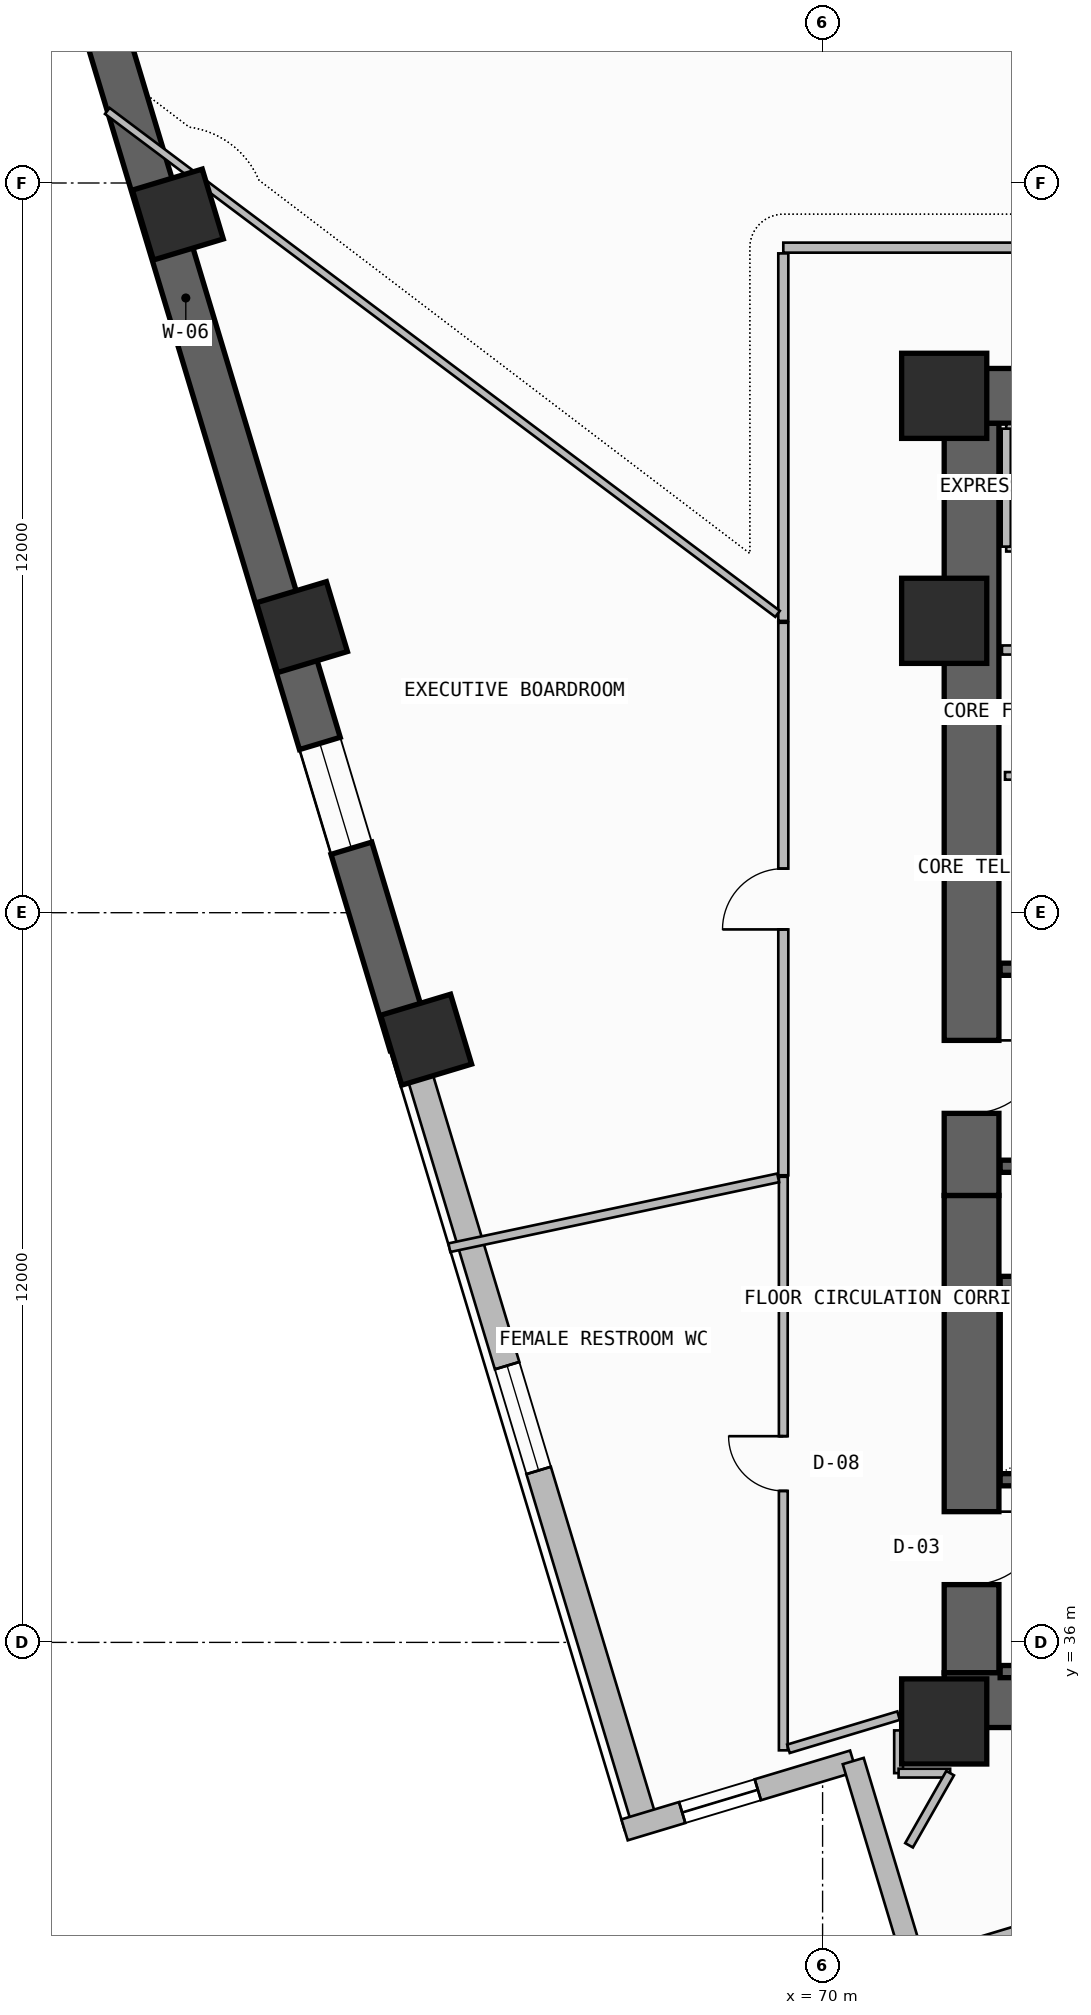
"""IFC4 building model, lengths in metres.
Left out: names, types, materials, properties, quantities, classifications, styles, units other than length and angle.
Written with IfcOpenShell. Run it as: python <this file> out.ifc"""

import sys

from ifc_helpers import new_model, si_unit, direction, frame, frame_2d, origin, origin_2d, place, context, subcontext, project, spatial, rectangle, extrude, element, fill, save


model = new_model("IFC4")
c1 = context("Model", 3, precision=1e-05, world=origin(), true_north=direction((0.0, 1.0)))
c2 = subcontext(c1, "Body", "Model", "MODEL_VIEW")
j1 = project(units=[si_unit("LENGTHUNIT", "METRE"), si_unit("PLANEANGLEUNIT", "RADIAN")], contexts=[c1])
p1 = place(None, origin())
s1 = spatial("IfcSite", under=j1, at=p1, CompositionType="ELEMENT")
p2 = place(p1, origin())
s2 = spatial("IfcBuilding", under=s1, at=p2, CompositionType="ELEMENT")
p3 = place(p2, frame((0.0, 0.0, 132.3)))
s3 = spatial("IfcBuildingStorey", under=s2, at=p3, CompositionType="ELEMENT", Elevation=132.3)
p4 = place(p3, frame((72.45, 35.5, -0.4), z_axis=(0.0, 0.0, 1.0), x_axis=(0.0, 1.0, 0.0)))
e1 = element("IfcWall", 1, at=p4, inside=s3, PredefinedType="SHEAR", context=c2, shape_type="SweptSolid", body=[
    extrude(rectangle(XDim=7.85, YDim=0.9, at=frame_2d((3.925, 0.0))), origin(), (0.0, 0.0, 1.0), 3.74),
])
p5 = place(p4, frame((1.45, 0.0, 0.4)))
e2 = element("IfcOpeningElement", 2, at=p5, cuts=e1, PredefinedType="OPENING", context=c2, shape_type="SweptSolid", body=[
    extrude(rectangle(XDim=1.2, YDim=2.2, at=frame_2d((0.6, 1.1))), frame((0.0, 0.46, 0.0), z_axis=(0.0, -1.0, 0.0), x_axis=(1.0, 0.0, 0.0)), (0.0, 0.0, 1.0), 0.92),
])
p6 = place(p3, frame((72.0, 35.05, -0.4), z_axis=(0.0, 0.0, 1.0), x_axis=(1.0, 0.0, 0.0)))
e3 = element("IfcWall", 3, at=p6, inside=s3, PredefinedType="SHEAR", context=c2, shape_type="SweptSolid", body=[
    extrude(rectangle(XDim=13.9, YDim=0.9, at=frame_2d((6.95, 0.0))), origin(), (0.0, 0.0, 1.0), 3.74),
])
p7 = place(p3, frame((72.45, 43.35, -0.4), z_axis=(0.0, 0.0, 1.0), x_axis=(0.0, 1.0, 0.0)))
e4 = element("IfcWall", 4, at=p7, inside=s3, PredefinedType="SHEAR", context=c2, shape_type="SweptSolid", body=[
    extrude(rectangle(XDim=12.7, YDim=0.9, at=frame_2d((6.35, 0.0))), origin(), (0.0, 0.0, 1.0), 3.74),
])
p8 = place(p7, frame((1.35, 0.0, 0.4)))
e5 = element("IfcOpeningElement", 5, at=p8, cuts=e4, PredefinedType="OPENING", context=c2, shape_type="SweptSolid", body=[
    extrude(rectangle(XDim=1.2, YDim=2.2, at=frame_2d((0.6, 1.1))), frame((0.0, 0.46, 0.0), z_axis=(0.0, -1.0, 0.0), x_axis=(1.0, 0.0, 0.0)), (0.0, 0.0, 1.0), 0.92),
])
p9 = place(p3, frame((72.0, 56.5, -0.4), z_axis=(0.0, 0.0, 1.0), x_axis=(1.0, 0.0, 0.0)))
e6 = element("IfcWall", 6, at=p9, inside=s3, PredefinedType="SHEAR", context=c2, shape_type="SweptSolid", body=[
    extrude(rectangle(XDim=13.9, YDim=0.9, at=frame_2d((6.95, 0.0))), origin(), (0.0, 0.0, 1.0), 3.74),
])
for number, where, z_axis, x_axis in (
    (7, (72.0, 34.7, 0.0), (0.0, 0.0, 1.0), (1.0, 0.0, 0.0)),
    (8, (72.0, 52.8, 0.0), (0.0, 0.0, 1.0), (1.0, 0.0, 0.0)),
    (9, (72.0, 56.5, 0.0), (0.0, 0.0, 1.0), (1.0, 0.0, 0.0)),
):
    element("IfcColumn", number, at=place(p3, frame(where, z_axis=z_axis, x_axis=x_axis)), inside=s3, PredefinedType="COLUMN", context=c2, shape_type="SweptSolid", body=[
        extrude(rectangle(XDim=1.4, YDim=1.4, at=origin_2d()), origin(), (0.0, 0.0, 1.0), 3.6),
    ])
for number, where, z_axis, x_axis in (
    (10, (59.396, 59.481, -0.4), (0.0, 0.0, 1.0), (-0.288, 0.958, 0.0)),
    (11, (61.438, 52.696, -0.4), (0.0, 0.0, 1.0), (-0.288, 0.958, 0.0)),
):
    element("IfcColumn", number, at=place(p3, frame(where, z_axis=z_axis, x_axis=x_axis)), inside=s3, PredefinedType="COLUMN", context=c2, shape_type="SweptSolid", body=[
        extrude(rectangle(XDim=1.2, YDim=1.2, at=origin_2d()), origin(), (0.0, 0.0, 1.0), 4.0),
    ])
p10 = place(p3, frame((63.48, 45.912, 0.0), z_axis=(0.0, 0.0, 1.0), x_axis=(-0.288196268134, 0.957571360805, 0.0)))
e12 = element("IfcColumn", 12, at=p10, inside=s3, PredefinedType="COLUMN", context=c2, shape_type="SweptSolid", body=[
    extrude(rectangle(XDim=1.2, YDim=1.2, at=origin_2d()), origin(), (0.0, 0.0, 1.0), 3.6),
])
p11 = place(p3, frame((71.535, 30.624, 0.0), z_axis=(0.0, 0.0, 1.0), x_axis=(0.957571099539, 0.288197136226, 0.0)))
e13 = element("IfcWall", 13, at=p11, inside=s3, PredefinedType="SOLIDWALL", context=c2, shape_type="SweptSolid", body=[
    extrude(rectangle(XDim=12.236, YDim=0.42, at=frame_2d((6.118, 0.0))), origin(), (0.0, 0.0, 1.0), 3.34),
])
p12 = place(p11, frame((7.264, 0.0, 1.2)))
e14 = element("IfcOpeningElement", 14, at=p12, cuts=e13, PredefinedType="OPENING", context=c2, shape_type="SweptSolid", body=[
    extrude(rectangle(XDim=2.4, YDim=0.9, at=frame_2d((1.2, 0.45))), frame((0.0, 0.22, 0.0), z_axis=(0.0, -1.0, 0.0), x_axis=(1.0, 0.0, 0.0)), (0.0, 0.0, 1.0), 0.44),
])
p13 = place(p3, frame((57.323, 65.434, -0.4), z_axis=(0.0, 0.0, 1.0), x_axis=(0.288188159352, -0.957573801234, 0.0)))
e15 = element("IfcWall", 15, at=p13, inside=s3, PredefinedType="SHEAR", context=c2, shape_type="SweptSolid", body=[
    extrude(rectangle(XDim=20.469, YDim=0.7, at=frame_2d((10.234, 0.0))), origin(), (0.0, 0.0, 1.0), 3.74),
])
p14 = place(p13, frame((15.3, 0.0, 1.2)))
e16 = element("IfcOpeningElement", 16, at=p14, cuts=e15, PredefinedType="OPENING", context=c2, shape_type="SweptSolid", body=[
    extrude(rectangle(XDim=1.8, YDim=0.9, at=frame_2d((0.9, 0.45))), frame((0.0, 0.36, 0.0), z_axis=(0.0, -1.0, 0.0), x_axis=(1.0, 0.0, 0.0)), (0.0, 0.0, 1.0), 0.72),
])
p15 = place(p3, frame((63.221, 45.834, 0.0), z_axis=(0.0, 0.0, 1.0), x_axis=(0.288202962273, -0.957569346072, 0.0)))
e17 = element("IfcWall", 17, at=p15, inside=s3, PredefinedType="SOLIDWALL", context=c2, shape_type="SweptSolid", body=[
    extrude(rectangle(XDim=13.384, YDim=0.42, at=frame_2d((6.692, 0.0))), origin(), (0.0, 0.0, 1.0), 2.725),
])
p16 = place(p15, frame((5.517, 0.0, 1.2)))
e18 = element("IfcOpeningElement", 18, at=p16, cuts=e17, PredefinedType="OPENING", context=c2, shape_type="SweptSolid", body=[
    extrude(rectangle(XDim=1.8, YDim=0.9, at=frame_2d((0.9, 0.45))), frame((0.0, 0.22, 0.0), z_axis=(0.0, -1.0, 0.0), x_axis=(1.0, 0.0, 0.0)), (0.0, 0.0, 1.0), 0.44),
])
p17 = place(p3, frame((66.743, 32.917, 0.0), z_axis=(0.0, 0.0, 1.0), x_axis=(0.957584687378, 0.288151985068, 0.0)))
e19 = element("IfcWall", 19, at=p17, inside=s3, PredefinedType="SOLIDWALL", context=c2, shape_type="SweptSolid", body=[
    extrude(rectangle(XDim=3.927, YDim=0.36, at=frame_2d((1.963, 0.0))), origin(), (0.0, 0.0, 1.0), 3.34),
])
p18 = place(p17, frame((0.989, 0.0, 0.45)))
e20 = element("IfcOpeningElement", 20, at=p18, cuts=e19, PredefinedType="OPENING", context=c2, shape_type="SweptSolid", body=[
    extrude(rectangle(XDim=1.3, YDim=2.4, at=frame_2d((0.65, 1.2))), frame((0.0, 0.19, 0.0), z_axis=(0.0, -1.0, 0.0), x_axis=(1.0, 0.0, 0.0)), (0.0, 0.0, 1.0), 0.38),
])
p19 = place(p3, frame((70.504, 34.049, 0.0), z_axis=(0.0, 0.0, 1.0), x_axis=(0.288169140251, -0.957579524952, 0.0)))
e21 = element("IfcWall", 21, at=p19, inside=s3, PredefinedType="SOLIDWALL", context=c2, shape_type="SweptSolid", body=[
    extrude(rectangle(XDim=3.927, YDim=0.36, at=frame_2d((1.963, 0.0))), origin(), (0.0, 0.0, 1.0), 3.34),
])
p20 = place(p3, frame((89.368, 62.13, 0.0), z_axis=(0.0, 0.0, 1.0), x_axis=(-0.942033439765, 0.335518998515, 0.0)))
e22 = element("IfcWall", 22, at=p20, inside=s3, PredefinedType="PARAPET", context=c2, shape_type="SweptSolid", body=[
    extrude(rectangle(XDim=27.969, YDim=0.2, at=frame_2d((13.985, 0.0))), origin(), (0.0, 0.0, 1.0), 1.15),
])
for number, where, z_axis, x_axis in (
    (23, (72.92, 35.52, -0.4), (0.0, 0.0, 1.0), (1.0, 0.0, 0.0)),
    (24, (72.92, 38.675, -0.4), (0.0, 0.0, 1.0), (1.0, 0.0, 0.0)),
):
    element("IfcWall", number, at=place(p3, frame(where, z_axis=z_axis, x_axis=x_axis)), inside=s3, PredefinedType="SOLIDWALL", context=c2, shape_type="SweptSolid", body=[
        extrude(rectangle(XDim=7.7, YDim=0.2, at=frame_2d((3.85, 0.0))), origin(), (0.0, 0.0, 1.0), 3.74),
    ])
p21 = place(p3, frame((72.92, 41.92, -0.4), z_axis=(0.0, 0.0, 1.0), x_axis=(1.0, 0.0, 0.0)))
e25 = element("IfcWall", 25, at=p21, inside=s3, PredefinedType="SOLIDWALL", context=c2, shape_type="SweptSolid", body=[
    extrude(rectangle(XDim=7.58, YDim=0.2, at=frame_2d((3.79, 0.0))), origin(), (0.0, 0.0, 1.0), 3.74),
])
for number, where, z_axis, x_axis in (
    (26, (72.92, 43.83, -0.4), (0.0, 0.0, 1.0), (1.0, 0.0, 0.0)),
    (27, (72.92, 47.07, -0.4), (0.0, 0.0, 1.0), (1.0, 0.0, 0.0)),
):
    element("IfcWall", number, at=place(p3, frame(where, z_axis=z_axis, x_axis=x_axis)), inside=s3, PredefinedType="SOLIDWALL", context=c2, shape_type="SweptSolid", body=[
        extrude(rectangle(XDim=7.7, YDim=0.2, at=frame_2d((3.85, 0.0))), origin(), (0.0, 0.0, 1.0), 3.74),
    ])
p22 = place(p3, frame((72.95, 52.32, 0.0), z_axis=(0.0, 0.0, 1.0), x_axis=(1.0, 0.0, 0.0)))
e28 = element("IfcWall", 28, at=p22, inside=s3, PredefinedType="SOLIDWALL", context=c2, shape_type="SweptSolid", body=[
    extrude(rectangle(XDim=3.33, YDim=0.15, at=frame_2d((1.665, 0.0))), origin(), (0.0, 0.0, 1.0), 3.34),
])
p23 = place(p3, frame((73.0, 50.25, 0.0), z_axis=(0.0, 0.0, 1.0), x_axis=(1.0, 0.0, 0.0)))
e29 = element("IfcWall", 29, at=p23, inside=s3, PredefinedType="PARTITIONING", context=c2, shape_type="SweptSolid", body=[
    extrude(rectangle(XDim=3.28, YDim=0.125, at=frame_2d((1.64, 0.0))), origin(), (0.0, 0.0, 1.0), 3.34),
])
p24 = place(p3, frame((73.02, 54.02, 0.0), z_axis=(0.0, 0.0, 1.0), x_axis=(1.0, 0.0, 0.0)))
e30 = element("IfcWall", 30, at=p24, inside=s3, PredefinedType="SOLIDWALL", context=c2, shape_type="SweptSolid", body=[
    extrude(rectangle(XDim=12.08, YDim=0.16, at=frame_2d((6.04, 0.0))), origin(), (0.0, 0.0, 1.0), 3.34),
])
p25 = place(p3, frame((73.02, 55.96, 0.0), z_axis=(0.0, 0.0, 1.0), x_axis=(1.0, 0.0, 0.0)))
e31 = element("IfcWall", 31, at=p25, inside=s3, PredefinedType="SOLIDWALL", context=c2, shape_type="SweptSolid", body=[
    extrude(rectangle(XDim=3.5, YDim=0.15, at=frame_2d((1.75, 0.0))), origin(), (0.0, 0.0, 1.0), 3.34),
])
p26 = place(p3, frame((73.02, 54.02, 0.0), z_axis=(0.0, 0.0, 1.0), x_axis=(0.0, 1.0, 0.0)))
e32 = element("IfcWall", 32, at=p26, inside=s3, PredefinedType="PLUMBINGWALL", context=c2, shape_type="SweptSolid", body=[
    extrude(rectangle(XDim=1.94, YDim=0.15, at=frame_2d((0.97, 0.0))), origin(), (0.0, 0.0, 1.0), 3.34),
])
p27 = place(p3, frame((69.354, 43.657, 0.0), z_axis=(0.0, 0.0, 1.0), x_axis=(0.0, -1.0, 0.0)))
e33 = element("IfcWall", 33, at=p27, inside=s3, PredefinedType="PARTITIONING", context=c2, shape_type="SweptSolid", body=[
    extrude(rectangle(XDim=9.432, YDim=0.145, at=frame_2d((4.716, 0.0))), origin(), (0.0, 0.0, 1.0), 3.34),
])
p28 = place(p27, frame((4.266, 0.0, 0.0)))
e34 = element("IfcOpeningElement", 34, at=p28, cuts=e33, PredefinedType="OPENING", context=c2, shape_type="SweptSolid", body=[
    extrude(rectangle(XDim=0.9, YDim=2.1, at=frame_2d((0.45, 1.05))), frame((0.0, 0.083, 0.0), z_axis=(0.0, -1.0, 0.0), x_axis=(1.0, 0.0, 0.0)), (0.0, 0.0, 1.0), 0.165),
])
p29 = place(p3, frame((69.438, 34.25, 0.0), z_axis=(0.0, 0.0, 1.0), x_axis=(0.957552396669, 0.288259271548, 0.0)))
e35 = element("IfcWall", 35, at=p29, inside=s3, PredefinedType="PARTITIONING", context=c2, shape_type="SweptSolid", body=[
    extrude(rectangle(XDim=1.892, YDim=0.145, at=frame_2d((0.946, 0.0))), origin(), (0.0, 0.0, 1.0), 3.34),
])
p30 = place(p3, frame((63.862, 42.491, 0.0), z_axis=(0.0, 0.0, 1.0), x_axis=(0.97817186946, 0.207797482653, 0.0)))
e36 = element("IfcWall", 36, at=p30, inside=s3, PredefinedType="PARTITIONING", context=c2, shape_type="SweptSolid", body=[
    extrude(rectangle(XDim=5.528, YDim=0.145, at=frame_2d((2.764, 0.0))), origin(), (0.0, 0.0, 1.0), 3.34),
])
p31 = place(p3, frame((77.867, 58.937, 0.0), z_axis=(0.0, 0.0, 1.0), x_axis=(-1.0, 0.0, 0.0)))
e37 = element("IfcWall", 37, at=p31, inside=s3, PredefinedType="PARTITIONING", context=c2, shape_type="SweptSolid", body=[
    extrude(rectangle(XDim=8.513, YDim=0.165, at=frame_2d((4.257, 0.0))), origin(), (0.0, 0.0, 1.0), 2.725),
])
p32 = place(p31, frame((2.69, 0.0, 0.0)))
e38 = element("IfcOpeningElement", 38, at=p32, cuts=e37, PredefinedType="OPENING", context=c2, shape_type="SweptSolid", body=[
    extrude(rectangle(XDim=1.0, YDim=2.2, at=frame_2d((0.5, 1.1))), frame((0.0, 0.093, 0.0), z_axis=(0.0, -1.0, 0.0), x_axis=(1.0, 0.0, 0.0)), (0.0, 0.0, 1.0), 0.185),
])
p33 = place(p3, frame((69.354, 58.843, 0.0), z_axis=(0.0, 0.0, 1.0), x_axis=(0.0, -1.0, 0.0)))
e39 = element("IfcWall", 39, at=p33, inside=s3, PredefinedType="PARTITIONING", context=c2, shape_type="SweptSolid", body=[
    extrude(rectangle(XDim=6.044, YDim=0.165, at=frame_2d((3.022, 0.0))), origin(), (0.0, 0.0, 1.0), 2.725),
])
p34 = place(p3, frame((69.259, 52.914, 0.0), z_axis=(0.0, 0.0, 1.0), x_axis=(-0.799887318225, 0.600150212983, 0.0)))
e40 = element("IfcWall", 40, at=p34, inside=s3, PredefinedType="PARTITIONING", context=c2, shape_type="SweptSolid", body=[
    extrude(rectangle(XDim=13.781, YDim=0.125, at=frame_2d((6.891, 0.0))), origin(), (0.0, 0.0, 1.0), 2.725),
])
p35 = place(p3, frame((69.354, 52.768, 0.0), z_axis=(0.0, 0.0, 1.0), x_axis=(0.0, -1.0, 0.0)))
e41 = element("IfcWall", 41, at=p35, inside=s3, PredefinedType="PARTITIONING", context=c2, shape_type="SweptSolid", body=[
    extrude(rectangle(XDim=9.086, YDim=0.165, at=frame_2d((4.543, 0.0))), origin(), (0.0, 0.0, 1.0), 2.725),
])
p36 = place(p35, frame((4.043, 0.0, 0.0)))
e42 = element("IfcOpeningElement", 42, at=p36, cuts=e41, PredefinedType="OPENING", context=c2, shape_type="SweptSolid", body=[
    extrude(rectangle(XDim=1.0, YDim=2.2, at=frame_2d((0.5, 1.1))), frame((0.0, 0.093, 0.0), z_axis=(0.0, -1.0, 0.0), x_axis=(1.0, 0.0, 0.0)), (0.0, 0.0, 1.0), 0.185),
])
p37 = place(p3, frame((71.25, 34.553, 0.0), z_axis=(0.0, 0.0, 1.0), x_axis=(0.0, -1.0, 0.0)))
e43 = element("IfcWall", 43, at=p37, inside=s3, PredefinedType="PARTITIONING", context=c2, shape_type="SweptSolid", body=[
    extrude(rectangle(XDim=0.703, YDim=0.145, at=frame_2d((0.351, 0.0))), origin(), (0.0, 0.0, 1.0), 3.34),
])
p38 = place(p3, frame((71.25, 33.85, 0.0), z_axis=(0.0, 0.0, 1.0), x_axis=(1.0, 0.0, 0.0)))
e44 = element("IfcWall", 44, at=p38, inside=s3, PredefinedType="PARTITIONING", context=c2, shape_type="SweptSolid", body=[
    extrude(rectangle(XDim=0.848, YDim=0.145, at=frame_2d((0.424, 0.0))), origin(), (0.0, 0.0, 1.0), 3.34),
])
p39 = place(p3, frame((72.098, 33.85, 0.0), z_axis=(0.0, 0.0, 1.0), x_axis=(-0.494617377681, -0.869110838556, 0.0)))
e45 = element("IfcWall", 45, at=p39, inside=s3, PredefinedType="PARTITIONING", context=c2, shape_type="SweptSolid", body=[
    extrude(rectangle(XDim=1.366, YDim=0.145, at=frame_2d((0.683, 0.0))), origin(), (0.0, 0.0, 1.0), 3.34),
])
p40 = place(p14, origin())
e46 = element("IfcWindow", 46, at=p40, inside=s3, PartitioningType="SINGLE_PANEL", PredefinedType="WINDOW", context=c2, shape_type="SweptSolid", body=[
    extrude(rectangle(XDim=1.8, YDim=0.9, at=frame_2d((0.9, 0.45))), frame((0.0, 0.03, 0.0), z_axis=(0.0, -1.0, 0.0), x_axis=(1.0, 0.0, 0.0)), (0.0, 0.0, 1.0), 0.06),
])
fill(e16, e46)
p41 = place(p16, origin())
e47 = element("IfcWindow", 47, at=p41, inside=s3, PartitioningType="SINGLE_PANEL", PredefinedType="WINDOW", context=c2, shape_type="SweptSolid", body=[
    extrude(rectangle(XDim=1.8, YDim=0.9, at=frame_2d((0.9, 0.45))), frame((0.0, 0.03, 0.0), z_axis=(0.0, -1.0, 0.0), x_axis=(1.0, 0.0, 0.0)), (0.0, 0.0, 1.0), 0.06),
])
fill(e18, e47)
p42 = place(p18, origin())
e48 = element("IfcWindow", 48, at=p42, inside=s3, PartitioningType="SINGLE_PANEL", PredefinedType="WINDOW", context=c2, shape_type="SweptSolid", body=[
    extrude(rectangle(XDim=1.3, YDim=2.4, at=frame_2d((0.65, 1.2))), frame((0.0, 0.03, 0.0), z_axis=(0.0, -1.0, 0.0), x_axis=(1.0, 0.0, 0.0)), (0.0, 0.0, 1.0), 0.06),
])
fill(e20, e48)
p43 = place(p5, frame((1.2, 0.0, 0.0), z_axis=(0.0, 0.0, 1.0), x_axis=(-1.0, 0.0, 0.0)))
e49 = element("IfcDoor", 49, at=p43, inside=s3, OperationType="SINGLE_SWING_LEFT", PredefinedType="USERDEFINED", context=c2, shape_type="SweptSolid", body=[
    extrude(rectangle(XDim=1.2, YDim=2.2, at=frame_2d((0.6, 1.1))), frame((0.0, 0.025, 0.0), z_axis=(0.0, -1.0, 0.0), x_axis=(1.0, 0.0, 0.0)), (0.0, 0.0, 1.0), 0.05),
])
fill(e2, e49)
p44 = place(p8, frame((1.2, 0.0, 0.0), z_axis=(0.0, 0.0, 1.0), x_axis=(-1.0, 0.0, 0.0)))
e50 = element("IfcDoor", 50, at=p44, inside=s3, OperationType="SINGLE_SWING_LEFT", PredefinedType="USERDEFINED", context=c2, shape_type="SweptSolid", body=[
    extrude(rectangle(XDim=1.2, YDim=2.2, at=frame_2d((0.6, 1.1))), frame((0.0, 0.025, 0.0), z_axis=(0.0, -1.0, 0.0), x_axis=(1.0, 0.0, 0.0)), (0.0, 0.0, 1.0), 0.05),
])
fill(e5, e50)
p45 = place(p28, frame((0.9, 0.0, 0.0), z_axis=(0.0, 0.0, 1.0), x_axis=(-1.0, 0.0, 0.0)))
e51 = element("IfcDoor", 51, at=p45, inside=s3, OperationType="SINGLE_SWING_RIGHT", PredefinedType="DOOR", context=c2, shape_type="SweptSolid", body=[
    extrude(rectangle(XDim=0.9, YDim=2.1, at=frame_2d((0.45, 1.05))), frame((0.0, 0.025, 0.0), z_axis=(0.0, -1.0, 0.0), x_axis=(1.0, 0.0, 0.0)), (0.0, 0.0, 1.0), 0.05),
])
fill(e34, e51)
p46 = place(p36, frame((1.0, 0.0, 0.0), z_axis=(0.0, 0.0, 1.0), x_axis=(-1.0, 0.0, 0.0)))
e52 = element("IfcDoor", 52, at=p46, inside=s3, OperationType="SINGLE_SWING_LEFT", PredefinedType="DOOR", context=c2, shape_type="SweptSolid", body=[
    extrude(rectangle(XDim=1.0, YDim=2.2, at=frame_2d((0.5, 1.1))), frame((0.0, 0.025, 0.0), z_axis=(0.0, -1.0, 0.0), x_axis=(1.0, 0.0, 0.0)), (0.0, 0.0, 1.0), 0.05),
])
fill(e42, e52)
save(model, sys.argv[1])
